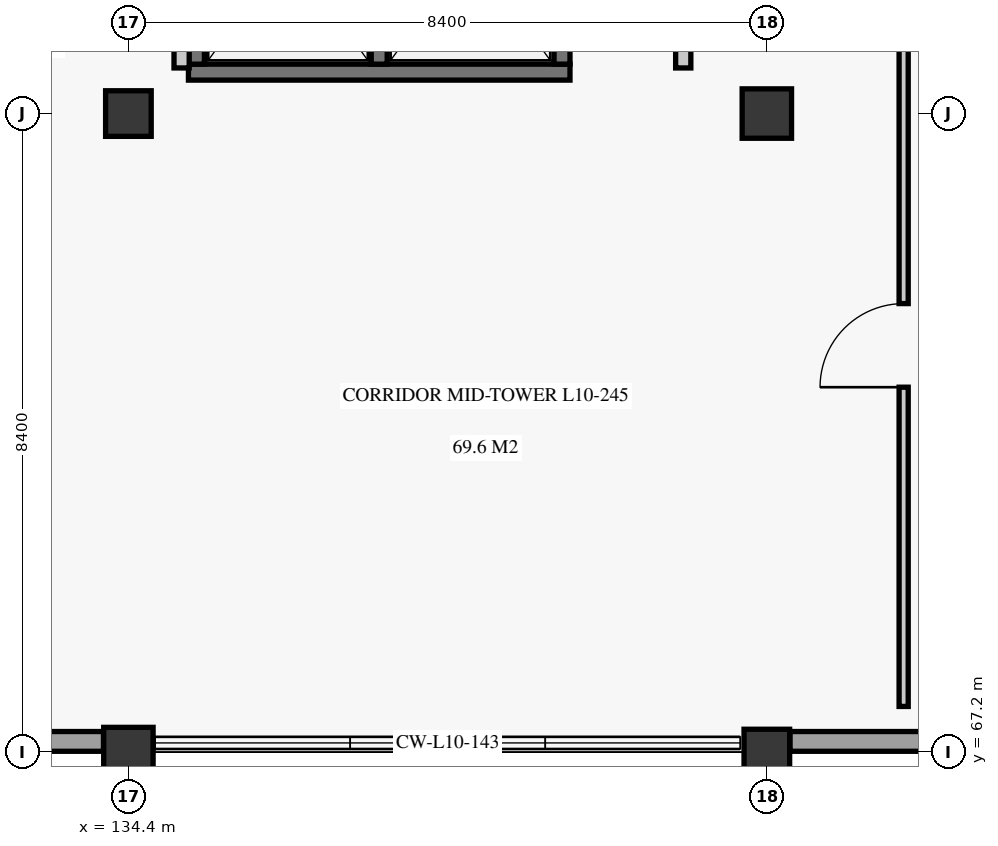
"""IFC4 building model, lengths in metres.
Left out: names, types, materials, properties, quantities, classifications, styles, units other than length and angle.
Written with IfcOpenShell. Run it as: python <this file> out.ifc"""

import sys

from ifc_helpers import new_model, si_unit, direction, frame, frame_2d, origin, origin_2d, place, context, subcontext, project, spatial, rectangle, extrude, element, fill, save


model = new_model("IFC4")
c1 = context("Model", 3, precision=1e-05, world=origin(), true_north=direction((0.0, 1.0)))
c2 = subcontext(c1, "Body", "Model", "MODEL_VIEW")
j1 = project(units=[si_unit("LENGTHUNIT", "METRE"), si_unit("PLANEANGLEUNIT", "RADIAN")], contexts=[c1])
p1 = place(None, origin())
s1 = spatial("IfcSite", under=j1, at=p1, CompositionType="ELEMENT")
p2 = place(p1, origin())
s2 = spatial("IfcBuilding", under=s1, at=p2, CompositionType="ELEMENT")
p3 = place(p2, frame((0.0, 0.0, 42.7)))
s3 = spatial("IfcBuildingStorey", under=s2, at=p3, CompositionType="ELEMENT", Elevation=42.7)
p4 = place(p3, frame((134.4, 67.2, 0.0), z_axis=(0.0, 0.0, 1.0), x_axis=(1.0, 0.0, 0.0)))
e1 = element("IfcColumn", 1, at=p4, inside=s3, PredefinedType="COLUMN", context=c2, shape_type="SweptSolid", body=[
    extrude(rectangle(XDim=0.65, YDim=0.65, at=origin_2d()), origin(), (0.0, 0.0, 1.0), 3.72),
])
for number, where, z_axis, x_axis in (
    (2, (134.4, 75.6, 0.0), (0.0, 0.0, 1.0), (1.0, 0.0, 0.0)),
    (3, (142.8, 67.2, 0.0), (0.0, 0.0, 1.0), (1.0, 0.0, 0.0)),
):
    element("IfcColumn", number, at=place(p3, frame(where, z_axis=z_axis, x_axis=x_axis)), inside=s3, PredefinedType="COLUMN", context=c2, shape_type="SweptSolid", body=[
        extrude(rectangle(XDim=0.6, YDim=0.6, at=origin_2d()), origin(), (0.0, 0.0, 1.0), 3.72),
    ])
p5 = place(p3, frame((142.8, 75.6, 0.0), z_axis=(0.0, 0.0, 1.0), x_axis=(1.0, 0.0, 0.0)))
e4 = element("IfcColumn", 4, at=p5, inside=s3, PredefinedType="COLUMN", context=c2, shape_type="SweptSolid", body=[
    extrude(rectangle(XDim=0.65, YDim=0.65, at=origin_2d()), origin(), (0.0, 0.0, 1.0), 3.72),
])
p6 = place(p3, frame((126.304, 67.34, 0.0), z_axis=(0.0, 0.0, 1.0), x_axis=(1.0, 0.0, 0.0)))
e5 = element("IfcWall", 5, at=p6, inside=s3, PredefinedType="SOLIDWALL", context=c2, shape_type="SweptSolid", body=[
    extrude(rectangle(XDim=7.768, YDim=0.26, at=frame_2d((3.884, 0.0))), origin(), (0.0, 0.0, 1.0), 3.04),
])
p7 = place(p6, frame((2.946, 0.0, 0.85)))
e6 = element("IfcOpeningElement", 6, at=p7, cuts=e5, PredefinedType="OPENING", context=c2, shape_type="SweptSolid", body=[
    extrude(rectangle(XDim=1.9, YDim=1.75, at=frame_2d((0.95, 0.875))), frame((0.0, 0.14, 0.0), z_axis=(0.0, -1.0, 0.0), x_axis=(1.0, 0.0, 0.0)), (0.0, 0.0, 1.0), 0.28),
])
p8 = place(p3, frame((143.104, 67.34, 0.0), z_axis=(0.0, 0.0, 1.0), x_axis=(1.0, 0.0, 0.0)))
e7 = element("IfcWall", 7, at=p8, inside=s3, PredefinedType="SOLIDWALL", context=c2, shape_type="SweptSolid", body=[
    extrude(rectangle(XDim=7.768, YDim=0.26, at=frame_2d((3.884, 0.0))), origin(), (0.0, 0.0, 1.0), 3.04),
])
p9 = place(p8, frame((2.346, 0.0, 0.85)))
e8 = element("IfcOpeningElement", 8, at=p9, cuts=e7, PredefinedType="OPENING", context=c2, shape_type="SweptSolid", body=[
    extrude(rectangle(XDim=3.1, YDim=1.85, at=frame_2d((1.55, 0.925))), frame((0.0, 0.14, 0.0), z_axis=(0.0, -1.0, 0.0), x_axis=(1.0, 0.0, 0.0)), (0.0, 0.0, 1.0), 0.28),
])
p10 = place(p3, frame((135.19, 76.145, 0.0), z_axis=(0.0, 0.0, 1.0), x_axis=(1.0, 0.0, 0.0)))
e9 = element("IfcWall", 9, at=p10, inside=s3, PredefinedType="SHEAR", context=c2, shape_type="SweptSolid", body=[
    extrude(rectangle(XDim=5.02, YDim=0.21, at=frame_2d((2.51, 0.0))), origin(), (0.0, 0.0, 1.0), 3.72),
])
for number, where, z_axis, x_axis in (
    (10, (135.295, 76.25, 0.0), (0.0, 0.0, 1.0), (0.0, 1.0, 0.0)),
    (11, (140.105, 76.25, 0.0), (0.0, 0.0, 1.0), (0.0, 1.0, 0.0)),
    (12, (137.7, 76.25, 0.0), (0.0, 0.0, 1.0), (0.0, 1.0, 0.0)),
):
    element("IfcWall", number, at=place(p3, frame(where, z_axis=z_axis, x_axis=x_axis)), inside=s3, PredefinedType="SHEAR", context=c2, shape_type="SweptSolid", body=[
        extrude(rectangle(XDim=3.0, YDim=0.21, at=frame_2d((1.5, 0.0))), origin(), (0.0, 0.0, 1.0), 3.72),
    ])
for number, where, z_axis, x_axis in (
    (13, (135.1, 76.2, 0.0), (0.0, 0.0, 1.0), (0.0, 1.0, 0.0)),
    (14, (141.7, 76.2, 0.0), (0.0, 0.0, 1.0), (0.0, 1.0, 0.0)),
):
    element("IfcWall", number, at=place(p3, frame(where, z_axis=z_axis, x_axis=x_axis)), inside=s3, PredefinedType="PARTITIONING", context=c2, shape_type="SweptSolid", body=[
        extrude(rectangle(XDim=7.25, YDim=0.2, at=frame_2d((3.625, 0.0))), origin(), (0.0, 0.0, 1.0), 3.34),
    ])
p11 = place(p3, frame((144.6, 67.8, 0.0), z_axis=(0.0, 0.0, 1.0), x_axis=(0.0, 1.0, 0.0)))
e15 = element("IfcWall", 15, at=p11, inside=s3, PredefinedType="PARTITIONING", context=c2, shape_type="SweptSolid", body=[
    extrude(rectangle(XDim=32.4, YDim=0.12, at=frame_2d((16.2, 0.0))), origin(), (0.0, 0.0, 1.0), 3.34),
])
p12 = place(p11, frame((4.2, 0.0, 0.0)))
e16 = element("IfcOpeningElement", 16, at=p12, cuts=e15, PredefinedType="OPENING", context=c2, shape_type="SweptSolid", body=[
    extrude(rectangle(XDim=1.1, YDim=2.15, at=frame_2d((0.55, 1.075))), frame((0.0, 0.07, 0.0), z_axis=(0.0, -1.0, 0.0), x_axis=(1.0, 0.0, 0.0)), (0.0, 0.0, 1.0), 0.14),
])
p13 = place(p11, frame((26.4, 0.0, 0.0)))
e17 = element("IfcOpeningElement", 17, at=p13, cuts=e15, PredefinedType="OPENING", context=c2, shape_type="SweptSolid", body=[
    extrude(rectangle(XDim=1.2, YDim=2.3, at=frame_2d((0.6, 1.15))), frame((0.0, 0.07, 0.0), z_axis=(0.0, -1.0, 0.0), x_axis=(1.0, 0.0, 0.0)), (0.0, 0.0, 1.0), 0.14),
])
p14 = place(p12, origin())
e18 = element("IfcDoor", 18, at=p14, inside=s3, OperationType="SINGLE_SWING_LEFT", PredefinedType="DOOR", context=c2, shape_type="SweptSolid", body=[
    extrude(rectangle(XDim=1.1, YDim=2.15, at=frame_2d((0.55, 1.075))), frame((0.0, 0.025, 0.0), z_axis=(0.0, -1.0, 0.0), x_axis=(1.0, 0.0, 0.0)), (0.0, 0.0, 1.0), 0.05),
])
fill(e16, e18)
save(model, sys.argv[1])
